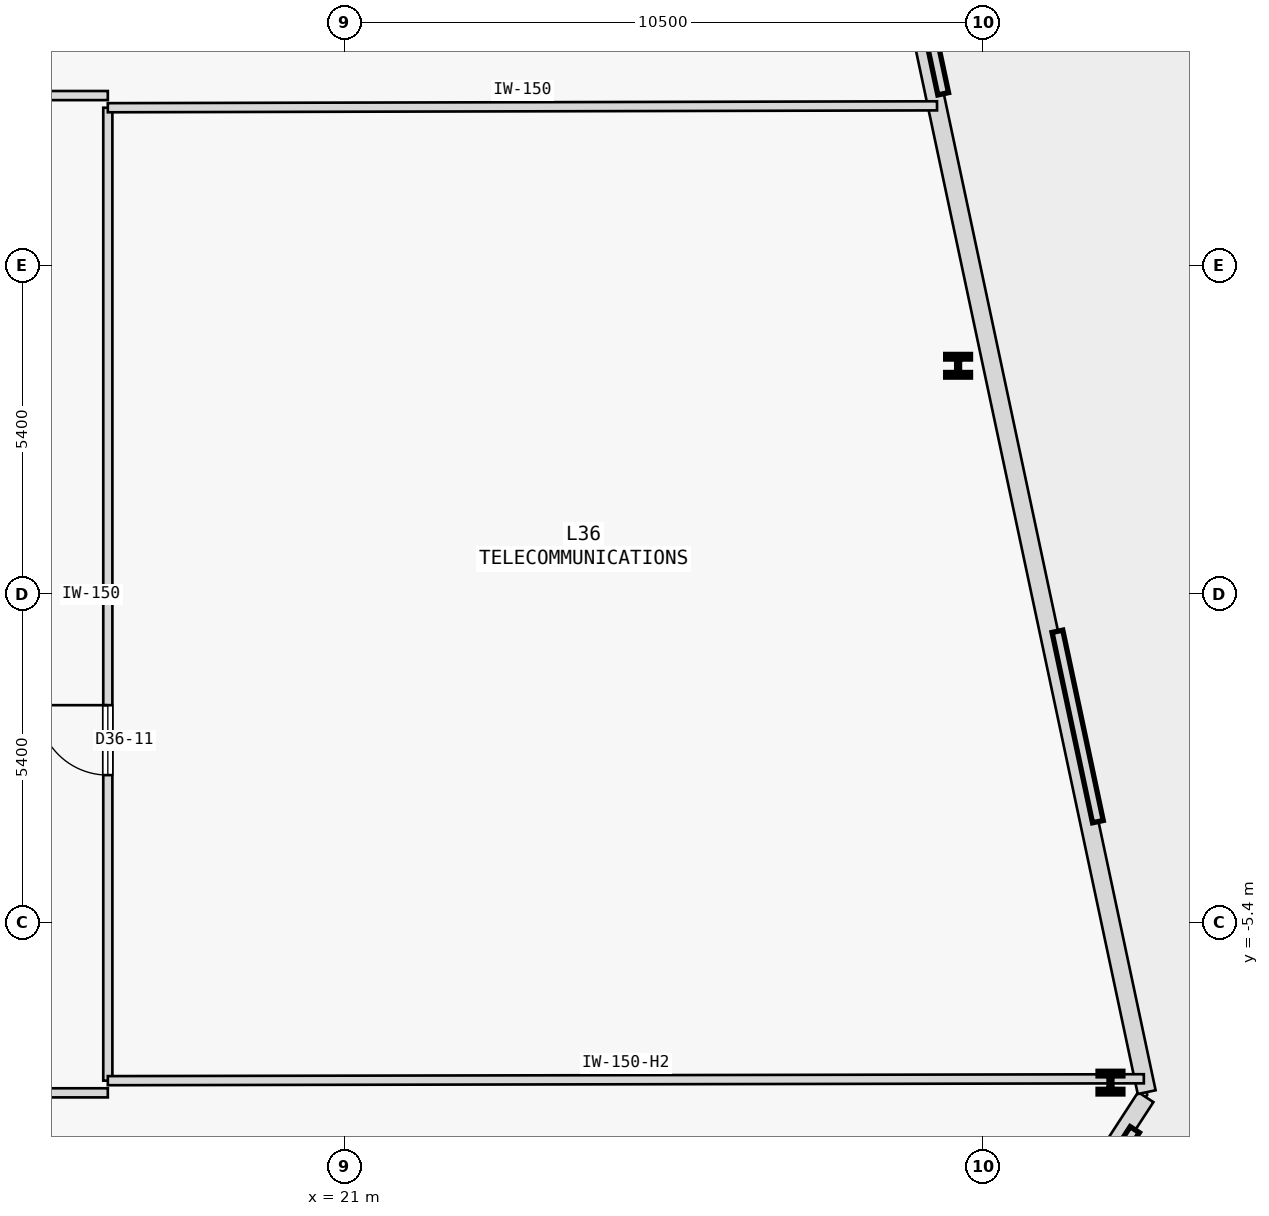
"""IFC4 building model, lengths in metres.
Left out: names, types, materials, properties, quantities, classifications, styles, units other than length and angle.
Written with IfcOpenShell. Run it as: python <this file> out.ifc"""

import sys

from ifc_helpers import new_model, si_unit, direction, frame, frame_2d, origin, origin_2d, place, context, subcontext, project, spatial, rectangle, i_section, extrude, element, fill, save


model = new_model("IFC4")
c1 = context("Model", 3, precision=1e-05, world=origin(), true_north=direction((0.0, 1.0)))
c2 = subcontext(c1, "Body", "Model", "MODEL_VIEW")
j1 = project(units=[si_unit("LENGTHUNIT", "METRE"), si_unit("PLANEANGLEUNIT", "RADIAN")], contexts=[c1])
p1 = place(None, origin())
s1 = spatial("IfcSite", under=j1, at=p1, CompositionType="ELEMENT")
p2 = place(p1, origin())
s2 = spatial("IfcBuilding", under=s1, at=p2, CompositionType="ELEMENT")
p3 = place(p2, frame((0.0, 0.0, 142.9)))
s3 = spatial("IfcBuildingStorey", under=s2, at=p3, CompositionType="ELEMENT", Elevation=142.9)
for number, where, z_axis, x_axis in (
    (1, (33.589, -8.032, 0.0), (0.0, 0.0, 1.0), (1.0, 0.0, 0.0)),
    (2, (31.083, 3.756, 0.0), (0.0, 0.0, 1.0), (1.0, 0.0, 0.0)),
):
    element("IfcColumn", number, at=place(p3, frame(where, z_axis=z_axis, x_axis=x_axis)), inside=s3, PredefinedType="COLUMN", context=c2, shape_type="SweptSolid", body=[
        extrude(i_section(OverallWidth=0.409, OverallDepth=0.374, WebThickness=0.048, FlangeThickness=0.077, FilletRadius=0.015, at=origin_2d()), origin(), (0.0, 0.0, 1.0), 4.4),
    ])
p4 = place(p3, frame((31.83, -11.872, 0.0), z_axis=(0.0, 0.0, 1.0), x_axis=(0.544622582474, 0.838681252121, 0.0)))
e3 = element("IfcWall", 3, at=p4, inside=s3, PredefinedType="STANDARD", context=c2, shape_type="SweptSolid", body=[
    extrude(rectangle(XDim=4.294, YDim=0.3, at=frame_2d((2.147, 0.0))), origin(), (0.0, 0.0, 1.0), 4.15),
])
p5 = place(p3, frame((34.184, -8.189, 0.0), z_axis=(0.0, 0.0, 1.0), x_axis=(-0.207907831433, 0.978148421063, 0.0)))
e4 = element("IfcWall", 4, at=p5, inside=s3, PredefinedType="STANDARD", context=c2, shape_type="SweptSolid", body=[
    extrude(rectangle(XDim=36.71, YDim=0.3, at=frame_2d((18.355, 0.0))), origin(), (0.0, 0.0, 1.0), 4.15),
])
p6 = place(p3, frame((-4.2, 8.2, 0.0), z_axis=(0.0, 0.0, 1.0), x_axis=(1.0, 0.0, 0.0)))
e5 = element("IfcWall", 5, at=p6, inside=s3, PredefinedType="PARTITIONING", context=c2, shape_type="SweptSolid", body=[
    extrude(rectangle(XDim=21.3, YDim=0.15, at=frame_2d((10.65, 0.0))), origin(), (0.0, 0.0, 1.0), 4.15),
])
p7 = place(p6, frame((10.075, 0.0, 0.0)))
e6 = element("IfcOpeningElement", 6, at=p7, cuts=e5, PredefinedType="OPENING", context=c2, shape_type="SweptSolid", body=[
    extrude(rectangle(XDim=1.15, YDim=2.15, at=frame_2d((0.575, 1.075))), frame((0.0, 0.085, 0.0), z_axis=(0.0, -1.0, 0.0), x_axis=(1.0, 0.0, 0.0)), (0.0, 0.0, 1.0), 0.17),
])
p8 = place(p3, frame((4.7, -8.2, 0.0), z_axis=(0.0, 0.0, 1.0), x_axis=(1.0, 0.0, 0.0)))
e7 = element("IfcWall", 7, at=p8, inside=s3, PredefinedType="PARTITIONING", context=c2, shape_type="SweptSolid", body=[
    extrude(rectangle(XDim=12.4, YDim=0.15, at=frame_2d((6.2, 0.0))), origin(), (0.0, 0.0, 1.0), 4.15),
])
p9 = place(p8, frame((7.485, 0.0, 0.0)))
e8 = element("IfcOpeningElement", 8, at=p9, cuts=e7, PredefinedType="OPENING", context=c2, shape_type="SweptSolid", body=[
    extrude(rectangle(XDim=1.15, YDim=2.15, at=frame_2d((0.575, 1.075))), frame((0.0, 0.085, 0.0), z_axis=(0.0, -1.0, 0.0), x_axis=(1.0, 0.0, 0.0)), (0.0, 0.0, 1.0), 0.17),
])
p10 = place(p3, frame((17.1, -8.0, 0.0), z_axis=(0.0, 0.0, 1.0), x_axis=(0.0, 1.0, 0.0)))
e9 = element("IfcWall", 9, at=p10, inside=s3, PredefinedType="PARTITIONING", context=c2, shape_type="SweptSolid", body=[
    extrude(rectangle(XDim=16.0, YDim=0.15, at=frame_2d((8.0, 0.0))), origin(), (0.0, 0.0, 1.0), 4.15),
])
p11 = place(p10, frame((5.025, 0.0, 0.0)))
e10 = element("IfcOpeningElement", 10, at=p11, cuts=e9, PredefinedType="OPENING", context=c2, shape_type="SweptSolid", body=[
    extrude(rectangle(XDim=1.15, YDim=2.15, at=frame_2d((0.575, 1.075))), frame((0.0, 0.085, 0.0), z_axis=(0.0, -1.0, 0.0), x_axis=(1.0, 0.0, 0.0)), (0.0, 0.0, 1.0), 0.17),
])
p12 = place(p3, frame((17.1, 8.0, 0.0), z_axis=(0.0, 0.0, 1.0), x_axis=(0.999997415053, 0.00227373864, 0.0)))
e11 = element("IfcWall", 11, at=p12, inside=s3, PredefinedType="PARTITIONING", context=c2, shape_type="SweptSolid", body=[
    extrude(rectangle(XDim=13.636, YDim=0.15, at=frame_2d((6.818, 0.0))), origin(), (0.0, 0.0, 1.0), 4.15),
])
p13 = place(p3, frame((17.1, -8.0, 0.0), z_axis=(0.0, 0.0, 1.0), x_axis=(0.999998344031, 0.001819872318, 0.0)))
e12 = element("IfcWall", 12, at=p13, inside=s3, PredefinedType="PARTITIONING", context=c2, shape_type="SweptSolid", body=[
    extrude(rectangle(XDim=17.037, YDim=0.15, at=frame_2d((8.519, 0.0))), origin(), (0.0, 0.0, 1.0), 3.55),
])
p14 = place(p11, origin())
e13 = element("IfcDoor", 13, at=p14, inside=s3, OperationType="SINGLE_SWING_RIGHT", PredefinedType="DOOR", context=c2, shape_type="SweptSolid", body=[
    extrude(rectangle(XDim=1.15, YDim=2.15, at=frame_2d((0.575, 1.075))), frame((0.0, 0.025, 0.0), z_axis=(0.0, -1.0, 0.0), x_axis=(1.0, 0.0, 0.0)), (0.0, 0.0, 1.0), 0.05),
])
fill(e10, e13)
save(model, sys.argv[1])
